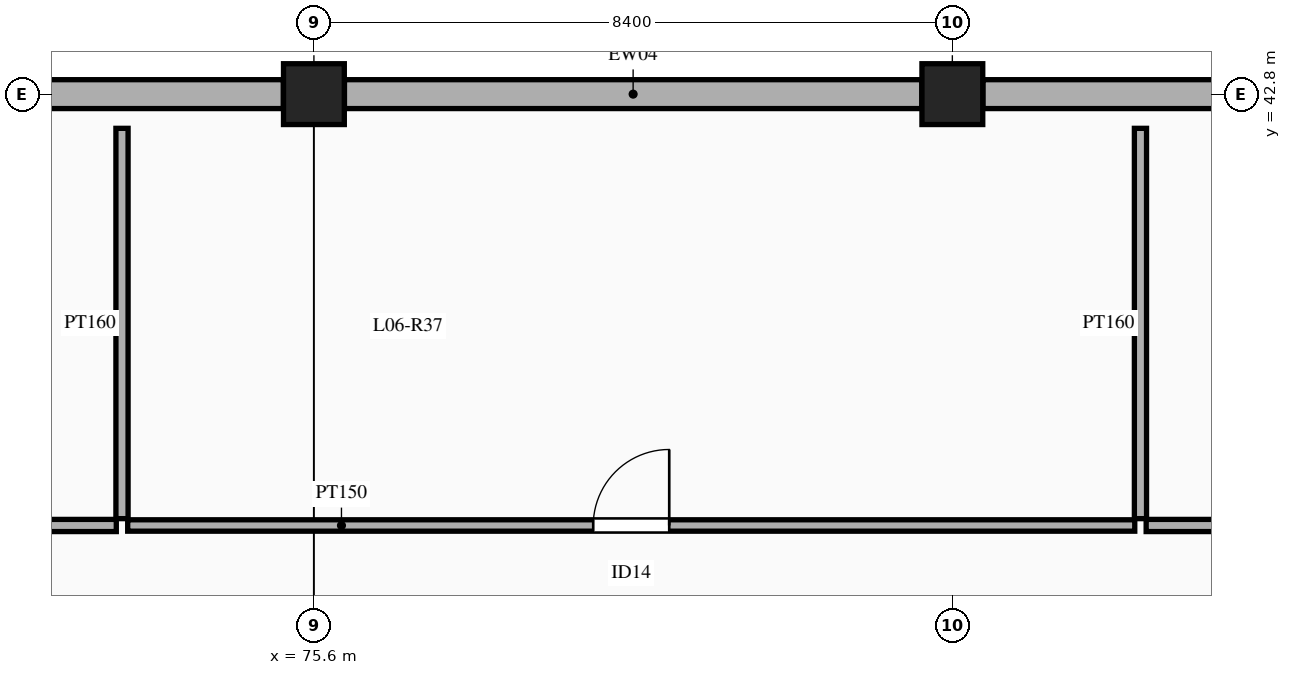
"""IFC4 building model, lengths in metres.
Left out: names, types, materials, properties, quantities, classifications, styles, units other than length and angle.
Written with IfcOpenShell. Run it as: python <this file> out.ifc"""

import sys

from ifc_helpers import new_model, si_unit, direction, frame, frame_2d, origin, origin_2d, place, context, subcontext, project, spatial, rectangle, extrude, element, fill, save


model = new_model("IFC4")
c1 = context("Model", 3, precision=1e-05, world=origin(), true_north=direction((0.0, 1.0)))
c2 = subcontext(c1, "Body", "Model", "MODEL_VIEW")
j1 = project(units=[si_unit("LENGTHUNIT", "METRE"), si_unit("PLANEANGLEUNIT", "RADIAN")], contexts=[c1])
p1 = place(None, origin())
s1 = spatial("IfcSite", under=j1, at=p1, CompositionType="ELEMENT")
p2 = place(p1, origin())
s2 = spatial("IfcBuilding", under=s1, at=p2, CompositionType="ELEMENT")
p3 = place(p2, frame((0.0, 0.0, 28.5)))
s3 = spatial("IfcBuildingStorey", under=s2, at=p3, CompositionType="ELEMENT", Elevation=28.5)
for number, where, z_axis, x_axis in (
    (1, (75.6, 42.8, 0.0), (0.0, 0.0, 1.0), (1.0, 0.0, 0.0)),
    (2, (84.0, 42.8, 0.0), (0.0, 0.0, 1.0), (1.0, 0.0, 0.0)),
):
    element("IfcColumn", number, at=place(p3, frame(where, z_axis=z_axis, x_axis=x_axis)), inside=s3, PredefinedType="COLUMN", context=c2, shape_type="SweptSolid", body=[
        extrude(rectangle(XDim=0.8, YDim=0.8, at=origin_2d()), origin(), (0.0, 0.0, 1.0), 4.5),
    ])
for number, where, z_axis, x_axis in (
    (3, (67.602, 42.8, 0.0), (0.0, 0.0, 1.0), (1.0, 0.0, 0.0)),
    (4, (76.002, 42.8, 0.0), (0.0, 0.0, 1.0), (1.0, 0.0, 0.0)),
    (5, (84.402, 42.8, 0.0), (0.0, 0.0, 1.0), (1.0, 0.0, 0.0)),
):
    element("IfcWall", number, at=place(p3, frame(where, z_axis=z_axis, x_axis=x_axis)), inside=s3, PredefinedType="SOLIDWALL", context=c2, shape_type="SweptSolid", body=[
        extrude(rectangle(XDim=7.596, YDim=0.38, at=frame_2d((3.798, 0.0))), origin(), (0.0, 0.0, 1.0), 3.55),
    ])
p4 = place(p3, frame((59.615, 37.125, 0.0), z_axis=(0.0, 0.0, 1.0), x_axis=(1.0, 0.0, 0.0)))
e6 = element("IfcWall", 6, at=p4, inside=s3, PredefinedType="PARTITIONING", context=c2, shape_type="SweptSolid", body=[
    extrude(rectangle(XDim=13.385, YDim=0.16, at=frame_2d((6.692, 0.0))), origin(), (0.0, 0.0, 1.0), 3.45),
])
p5 = place(p4, frame((4.609, 0.0, 0.0)))
e7 = element("IfcOpeningElement", 7, at=p5, cuts=e6, PredefinedType="OPENING", context=c2, shape_type="SweptSolid", body=[
    extrude(rectangle(XDim=1.16, YDim=2.2, at=frame_2d((0.58, 1.1))), frame((0.0, 0.09, 0.0), z_axis=(0.0, -1.0, 0.0), x_axis=(1.0, 0.0, 0.0)), (0.0, 0.0, 1.0), 0.18),
])
p6 = place(p3, frame((73.15, 37.125, 0.0), z_axis=(0.0, 0.0, 1.0), x_axis=(1.0, 0.0, 0.0)))
e8 = element("IfcWall", 8, at=p6, inside=s3, PredefinedType="PARTITIONING", context=c2, shape_type="SweptSolid", body=[
    extrude(rectangle(XDim=13.25, YDim=0.15, at=frame_2d((6.625, 0.0))), origin(), (0.0, 0.0, 1.0), 3.45),
])
p7 = place(p6, frame((6.125, 0.0, 0.0)))
e9 = element("IfcOpeningElement", 9, at=p7, cuts=e8, PredefinedType="OPENING", context=c2, shape_type="SweptSolid", body=[
    extrude(rectangle(XDim=1.0, YDim=2.15, at=frame_2d((0.5, 1.075))), frame((0.0, 0.085, 0.0), z_axis=(0.0, -1.0, 0.0), x_axis=(1.0, 0.0, 0.0)), (0.0, 0.0, 1.0), 0.17),
])
p8 = place(p3, frame((86.55, 37.125, 0.0), z_axis=(0.0, 0.0, 1.0), x_axis=(1.0, 0.0, 0.0)))
e10 = element("IfcWall", 10, at=p8, inside=s3, PredefinedType="PARTITIONING", context=c2, shape_type="SweptSolid", body=[
    extrude(rectangle(XDim=13.25, YDim=0.16, at=frame_2d((6.625, 0.0))), origin(), (0.0, 0.0, 1.0), 3.45),
])
p9 = place(p8, frame((7.789, 0.0, 0.0)))
e11 = element("IfcOpeningElement", 11, at=p9, cuts=e10, PredefinedType="OPENING", context=c2, shape_type="SweptSolid", body=[
    extrude(rectangle(XDim=1.14, YDim=2.22, at=frame_2d((0.57, 1.11))), frame((0.0, 0.09, 0.0), z_axis=(0.0, -1.0, 0.0), x_axis=(1.0, 0.0, 0.0)), (0.0, 0.0, 1.0), 0.18),
])
for number, where, z_axis, x_axis in (
    (12, (73.075, 37.215, 0.0), (0.0, 0.0, 1.0), (0.0, 1.0, 0.0)),
    (13, (86.475, 37.215, 0.0), (0.0, 0.0, 1.0), (0.0, 1.0, 0.0)),
):
    element("IfcWall", number, at=place(p3, frame(where, z_axis=z_axis, x_axis=x_axis)), inside=s3, PredefinedType="PARTITIONING", context=c2, shape_type="SweptSolid", body=[
        extrude(rectangle(XDim=5.135, YDim=0.16, at=frame_2d((2.567, 0.0))), origin(), (0.0, 0.0, 1.0), 3.45),
    ])
p10 = place(p7, origin())
e14 = element("IfcDoor", 14, at=p10, inside=s3, OperationType="SINGLE_SWING_RIGHT", PredefinedType="DOOR", context=c2, shape_type="SweptSolid", body=[
    extrude(rectangle(XDim=1.0, YDim=2.15, at=frame_2d((0.5, 1.075))), frame((0.0, 0.025, 0.0), z_axis=(0.0, -1.0, 0.0), x_axis=(1.0, 0.0, 0.0)), (0.0, 0.0, 1.0), 0.05),
])
fill(e9, e14)
save(model, sys.argv[1])
